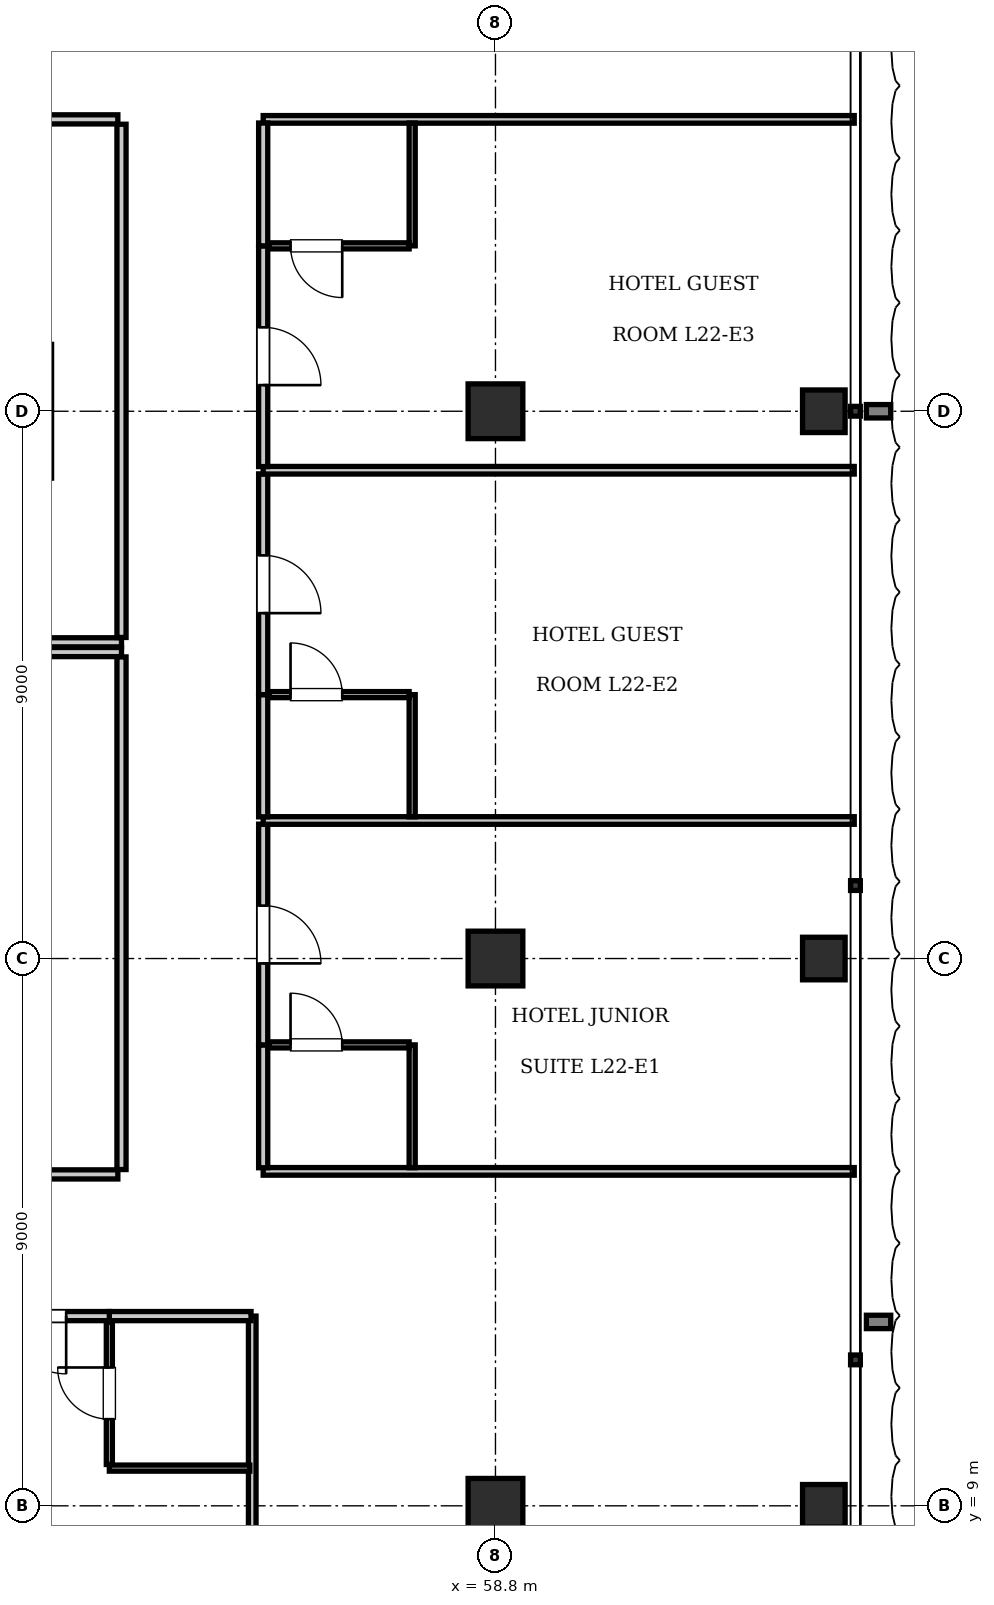
"""IFC4 building model, lengths in metres.
Left out: names, types, materials, properties, quantities, classifications, styles, units other than length and angle.
Written with IfcOpenShell. Run it as: python <this file> out.ifc"""

import sys

from ifc_helpers import new_model, si_unit, direction, frame, frame_2d, origin, origin_2d, place, context, subcontext, project, spatial, rectangle, i_section, extrude, element, fill, save


model = new_model("IFC4")
c1 = context("Model", 3, precision=1e-05, world=origin(), true_north=direction((0.0, 1.0)))
c2 = subcontext(c1, "Body", "Model", "MODEL_VIEW")
j1 = project(units=[si_unit("LENGTHUNIT", "METRE"), si_unit("PLANEANGLEUNIT", "RADIAN")], contexts=[c1])
p1 = place(None, origin())
s1 = spatial("IfcSite", under=j1, at=p1, CompositionType="ELEMENT")
p2 = place(p1, origin())
s2 = spatial("IfcBuilding", under=s1, at=p2, CompositionType="ELEMENT")
p3 = place(p2, frame((0.0, 0.0, 92.4)))
s3 = spatial("IfcBuildingStorey", under=s2, at=p3, CompositionType="ELEMENT", Elevation=92.4)
for number, where, z_axis, x_axis in (
    (1, (58.8, 9.0, 0.0), (0.0, 0.0, 1.0), (1.0, 0.0, 0.0)),
    (2, (58.8, 18.0, 0.0), (0.0, 0.0, 1.0), (1.0, 0.0, 0.0)),
    (3, (58.8, 27.0, 0.0), (0.0, 0.0, 1.0), (1.0, 0.0, 0.0)),
):
    element("IfcColumn", number, at=place(p3, frame(where, z_axis=z_axis, x_axis=x_axis)), inside=s3, PredefinedType="COLUMN", context=c2, shape_type="SweptSolid", body=[
        extrude(rectangle(XDim=0.9, YDim=0.9, at=origin_2d()), origin(), (0.0, 0.0, 1.0), 3.85),
    ])
for number, where, z_axis, x_axis in (
    (4, (64.2, 9.0, 0.0), (0.0, 0.0, 1.0), (1.0, 0.0, 0.0)),
    (5, (64.2, 18.0, 0.0), (0.0, 0.0, 1.0), (1.0, 0.0, 0.0)),
    (6, (64.2, 27.0, 0.0), (0.0, 0.0, 1.0), (1.0, 0.0, 0.0)),
):
    element("IfcColumn", number, at=place(p3, frame(where, z_axis=z_axis, x_axis=x_axis)), inside=s3, PredefinedType="COLUMN", context=c2, shape_type="SweptSolid", body=[
        extrude(i_section(OverallWidth=0.7, OverallDepth=0.7, WebThickness=0.028, FlangeThickness=0.044, at=origin_2d()), origin(), (0.0, 0.0, 1.0), 3.85),
    ])
p4 = place(p3, frame((22.95, 23.2, 0.0), z_axis=(0.0, 0.0, 1.0), x_axis=(1.0, 0.0, 0.0)))
e7 = element("IfcWall", 7, at=p4, inside=s3, PredefinedType="PARTITIONING", context=c2, shape_type="SweptSolid", body=[
    extrude(rectangle(XDim=29.7, YDim=0.15, at=frame_2d((14.85, 0.0))), origin(), (0.0, 0.0, 1.0), 3.61),
])
p5 = place(p3, frame((52.65, 23.28, 0.0), z_axis=(0.0, 0.0, 1.0), x_axis=(0.0, 1.0, 0.0)))
e8 = element("IfcWall", 8, at=p5, inside=s3, PredefinedType="PARTITIONING", context=c2, shape_type="SweptSolid", body=[
    extrude(rectangle(XDim=8.44, YDim=0.15, at=frame_2d((4.22, 0.0))), origin(), (0.0, 0.0, 1.0), 3.61),
])
p6 = place(p3, frame((42.582, 31.8, 0.0), z_axis=(0.0, 0.0, 1.0), x_axis=(1.0, 0.0, 0.0)))
e9 = element("IfcWall", 9, at=p6, inside=s3, PredefinedType="PARTITIONING", context=c2, shape_type="SweptSolid", body=[
    extrude(rectangle(XDim=10.008, YDim=0.15, at=frame_2d((5.004, 0.0))), origin(), (0.0, 0.0, 1.0), 3.61),
])
p7 = place(p6, frame((4.554, 0.0, 0.0)))
e10 = element("IfcOpeningElement", 10, at=p7, cuts=e9, PredefinedType="OPENING", context=c2, shape_type="SweptSolid", body=[
    extrude(rectangle(XDim=0.9, YDim=2.1, at=frame_2d((0.45, 1.05))), frame((0.0, 0.085, 0.0), z_axis=(0.0, -1.0, 0.0), x_axis=(1.0, 0.0, 0.0)), (0.0, 0.0, 1.0), 0.17),
])
p8 = place(p3, frame((22.95, 23.04, 0.0), z_axis=(0.0, 0.0, 1.0), x_axis=(1.0, 0.0, 0.0)))
e11 = element("IfcWall", 11, at=p8, inside=s3, PredefinedType="PARTITIONING", context=c2, shape_type="SweptSolid", body=[
    extrude(rectangle(XDim=29.7, YDim=0.15, at=frame_2d((14.85, 0.0))), origin(), (0.0, 0.0, 1.0), 3.61),
])
p9 = place(p3, frame((52.65, 14.53, 0.0), z_axis=(0.0, 0.0, 1.0), x_axis=(0.0, 1.0, 0.0)))
e12 = element("IfcWall", 12, at=p9, inside=s3, PredefinedType="PARTITIONING", context=c2, shape_type="SweptSolid", body=[
    extrude(rectangle(XDim=8.43, YDim=0.15, at=frame_2d((4.215, 0.0))), origin(), (0.0, 0.0, 1.0), 3.61),
])
p10 = place(p3, frame((33.969, 14.45, 0.0), z_axis=(0.0, 0.0, 1.0), x_axis=(1.0, 0.0, 0.0)))
e13 = element("IfcWall", 13, at=p10, inside=s3, PredefinedType="PARTITIONING", context=c2, shape_type="SweptSolid", body=[
    extrude(rectangle(XDim=18.621, YDim=0.15, at=frame_2d((9.311, 0.0))), origin(), (0.0, 0.0, 1.0), 3.61),
])
p11 = place(p10, frame((8.861, 0.0, 0.0)))
e14 = element("IfcOpeningElement", 14, at=p11, cuts=e13, PredefinedType="OPENING", context=c2, shape_type="SweptSolid", body=[
    extrude(rectangle(XDim=0.9, YDim=2.1, at=frame_2d((0.45, 1.05))), frame((0.0, 0.085, 0.0), z_axis=(0.0, -1.0, 0.0), x_axis=(1.0, 0.0, 0.0)), (0.0, 0.0, 1.0), 0.17),
])
p12 = place(p3, frame((54.8, 0.1, 0.0), z_axis=(0.0, 0.0, 1.0), x_axis=(0.0, 1.0, 0.0)))
e15 = element("IfcWall", 15, at=p12, inside=s3, PredefinedType="PARTITIONING", context=c2, shape_type="SweptSolid", body=[
    extrude(rectangle(XDim=12.02, YDim=0.125, at=frame_2d((6.01, 0.0))), origin(), (0.0, 0.0, 1.0), 3.61),
])
p13 = place(p3, frame((52.45, 12.12, 0.0), z_axis=(0.0, 0.0, 1.0), x_axis=(1.0, 0.0, 0.0)))
e16 = element("IfcWall", 16, at=p13, inside=s3, PredefinedType="PARTITIONING", context=c2, shape_type="SweptSolid", body=[
    extrude(rectangle(XDim=2.33, YDim=0.15, at=frame_2d((1.165, 0.0))), origin(), (0.0, 0.0, 1.0), 3.61),
])
p14 = place(p3, frame((52.45, 9.62, 0.0), z_axis=(0.0, 0.0, 1.0), x_axis=(1.0, 0.0, 0.0)))
e17 = element("IfcWall", 17, at=p14, inside=s3, PredefinedType="PARTITIONING", context=c2, shape_type="SweptSolid", body=[
    extrude(rectangle(XDim=2.31, YDim=0.1, at=frame_2d((1.155, 0.0))), origin(), (0.0, 0.0, 1.0), 3.61),
])
p15 = place(p3, frame((52.45, 9.68, 0.0), z_axis=(0.0, 0.0, 1.0), x_axis=(0.0, 1.0, 0.0)))
e18 = element("IfcWall", 18, at=p15, inside=s3, PredefinedType="PARTITIONING", context=c2, shape_type="SweptSolid", body=[
    extrude(rectangle(XDim=2.34, YDim=0.1, at=frame_2d((1.17, 0.0))), origin(), (0.0, 0.0, 1.0), 3.61),
])
p16 = place(p15, frame((0.745, 0.0, 0.0)))
e19 = element("IfcOpeningElement", 19, at=p16, cuts=e18, PredefinedType="OPENING", context=c2, shape_type="SweptSolid", body=[
    extrude(rectangle(XDim=0.85, YDim=2.1, at=frame_2d((0.425, 1.05))), frame((0.0, 0.06, 0.0), z_axis=(0.0, -1.0, 0.0), x_axis=(1.0, 0.0, 0.0)), (0.0, 0.0, 1.0), 0.12),
])
p17 = place(p3, frame((50.08, 12.12, 0.0), z_axis=(0.0, 0.0, 1.0), x_axis=(1.0, 0.0, 0.0)))
e20 = element("IfcWall", 20, at=p17, inside=s3, PredefinedType="PARTITIONING", context=c2, shape_type="SweptSolid", body=[
    extrude(rectangle(XDim=2.37, YDim=0.15, at=frame_2d((1.185, 0.0))), origin(), (0.0, 0.0, 1.0), 3.61),
])
p18 = place(p17, frame((0.71, 0.0, 0.0)))
e21 = element("IfcOpeningElement", 21, at=p18, cuts=e20, PredefinedType="OPENING", context=c2, shape_type="SweptSolid", body=[
    extrude(rectangle(XDim=0.95, YDim=2.15, at=frame_2d((0.475, 1.075))), frame((0.0, 0.085, 0.0), z_axis=(0.0, -1.0, 0.0), x_axis=(1.0, 0.0, 0.0)), (0.0, 0.0, 1.0), 0.17),
])
for number, where, z_axis, x_axis in (
    (22, (54.98, 14.5, 0.0), (0.0, 0.0, 1.0), (1.0, 0.0, 0.0)),
    (23, (54.98, 31.8, 0.0), (0.0, 0.0, 1.0), (1.0, 0.0, 0.0)),
):
    element("IfcWall", number, at=place(p3, frame(where, z_axis=z_axis, x_axis=x_axis)), inside=s3, PredefinedType="PARTITIONING", context=c2, shape_type="SweptSolid", body=[
        extrude(rectangle(XDim=9.72, YDim=0.125, at=frame_2d((4.86, 0.0))), origin(), (0.0, 0.0, 1.0), 3.61),
    ])
p19 = place(p3, frame((54.98, 14.56, 0.0), z_axis=(0.0, 0.0, 1.0), x_axis=(0.0, 1.0, 0.0)))
e24 = element("IfcWall", 24, at=p19, inside=s3, PredefinedType="PARTITIONING", context=c2, shape_type="SweptSolid", body=[
    extrude(rectangle(XDim=2.02, YDim=0.15, at=frame_2d((1.01, 0.0))), origin(), (0.0, 0.0, 1.0), 3.61),
])
p20 = place(p3, frame((54.98, 16.58, 0.0), z_axis=(0.0, 0.0, 1.0), x_axis=(0.0, 1.0, 0.0)))
e25 = element("IfcWall", 25, at=p20, inside=s3, PredefinedType="PARTITIONING", context=c2, shape_type="SweptSolid", body=[
    extrude(rectangle(XDim=3.63, YDim=0.15, at=frame_2d((1.815, 0.0))), origin(), (0.0, 0.0, 1.0), 3.61),
])
p21 = place(p20, frame((1.34, 0.0, 0.0)))
e26 = element("IfcOpeningElement", 26, at=p21, cuts=e25, PredefinedType="OPENING", context=c2, shape_type="SweptSolid", body=[
    extrude(rectangle(XDim=0.95, YDim=2.15, at=frame_2d((0.475, 1.075))), frame((0.0, 0.085, 0.0), z_axis=(0.0, -1.0, 0.0), x_axis=(1.0, 0.0, 0.0)), (0.0, 0.0, 1.0), 0.17),
])
p22 = place(p3, frame((57.43, 14.56, 0.0), z_axis=(0.0, 0.0, 1.0), x_axis=(0.0, 1.0, 0.0)))
e27 = element("IfcWall", 27, at=p22, inside=s3, PredefinedType="PARTITIONING", context=c2, shape_type="SweptSolid", body=[
    extrude(rectangle(XDim=2.02, YDim=0.1, at=frame_2d((1.01, 0.0))), origin(), (0.0, 0.0, 1.0), 3.61),
])
p23 = place(p3, frame((55.08, 16.58, 0.0), z_axis=(0.0, 0.0, 1.0), x_axis=(1.0, 0.0, 0.0)))
e28 = element("IfcWall", 28, at=p23, inside=s3, PredefinedType="PARTITIONING", context=c2, shape_type="SweptSolid", body=[
    extrude(rectangle(XDim=2.3, YDim=0.1, at=frame_2d((1.15, 0.0))), origin(), (0.0, 0.0, 1.0), 3.61),
])
p24 = place(p23, frame((0.35, 0.0, 0.0)))
e29 = element("IfcOpeningElement", 29, at=p24, cuts=e28, PredefinedType="OPENING", context=c2, shape_type="SweptSolid", body=[
    extrude(rectangle(XDim=0.85, YDim=2.1, at=frame_2d((0.425, 1.05))), frame((0.0, 0.06, 0.0), z_axis=(0.0, -1.0, 0.0), x_axis=(1.0, 0.0, 0.0)), (0.0, 0.0, 1.0), 0.12),
])
p25 = place(p3, frame((54.98, 20.27, 0.0), z_axis=(0.0, 0.0, 1.0), x_axis=(1.0, 0.0, 0.0)))
e30 = element("IfcWall", 30, at=p25, inside=s3, PredefinedType="PARTITIONING", context=c2, shape_type="SweptSolid", body=[
    extrude(rectangle(XDim=9.72, YDim=0.125, at=frame_2d((4.86, 0.0))), origin(), (0.0, 0.0, 1.0), 3.61),
])
p26 = place(p3, frame((54.98, 20.33, 0.0), z_axis=(0.0, 0.0, 1.0), x_axis=(0.0, 1.0, 0.0)))
e31 = element("IfcWall", 31, at=p26, inside=s3, PredefinedType="PARTITIONING", context=c2, shape_type="SweptSolid", body=[
    extrude(rectangle(XDim=2.01, YDim=0.15, at=frame_2d((1.005, 0.0))), origin(), (0.0, 0.0, 1.0), 3.61),
])
p27 = place(p3, frame((54.98, 22.34, 0.0), z_axis=(0.0, 0.0, 1.0), x_axis=(0.0, 1.0, 0.0)))
e32 = element("IfcWall", 32, at=p27, inside=s3, PredefinedType="PARTITIONING", context=c2, shape_type="SweptSolid", body=[
    extrude(rectangle(XDim=3.63, YDim=0.15, at=frame_2d((1.815, 0.0))), origin(), (0.0, 0.0, 1.0), 3.61),
])
p28 = place(p27, frame((1.34, 0.0, 0.0)))
e33 = element("IfcOpeningElement", 33, at=p28, cuts=e32, PredefinedType="OPENING", context=c2, shape_type="SweptSolid", body=[
    extrude(rectangle(XDim=0.95, YDim=2.15, at=frame_2d((0.475, 1.075))), frame((0.0, 0.085, 0.0), z_axis=(0.0, -1.0, 0.0), x_axis=(1.0, 0.0, 0.0)), (0.0, 0.0, 1.0), 0.17),
])
p29 = place(p3, frame((57.43, 20.33, 0.0), z_axis=(0.0, 0.0, 1.0), x_axis=(0.0, 1.0, 0.0)))
e34 = element("IfcWall", 34, at=p29, inside=s3, PredefinedType="PARTITIONING", context=c2, shape_type="SweptSolid", body=[
    extrude(rectangle(XDim=2.01, YDim=0.1, at=frame_2d((1.005, 0.0))), origin(), (0.0, 0.0, 1.0), 3.61),
])
p30 = place(p3, frame((55.08, 22.34, 0.0), z_axis=(0.0, 0.0, 1.0), x_axis=(1.0, 0.0, 0.0)))
e35 = element("IfcWall", 35, at=p30, inside=s3, PredefinedType="PARTITIONING", context=c2, shape_type="SweptSolid", body=[
    extrude(rectangle(XDim=2.3, YDim=0.1, at=frame_2d((1.15, 0.0))), origin(), (0.0, 0.0, 1.0), 3.61),
])
p31 = place(p30, frame((0.35, 0.0, 0.0)))
e36 = element("IfcOpeningElement", 36, at=p31, cuts=e35, PredefinedType="OPENING", context=c2, shape_type="SweptSolid", body=[
    extrude(rectangle(XDim=0.85, YDim=2.1, at=frame_2d((0.425, 1.05))), frame((0.0, 0.06, 0.0), z_axis=(0.0, -1.0, 0.0), x_axis=(1.0, 0.0, 0.0)), (0.0, 0.0, 1.0), 0.12),
])
p32 = place(p3, frame((54.98, 26.03, 0.0), z_axis=(0.0, 0.0, 1.0), x_axis=(1.0, 0.0, 0.0)))
e37 = element("IfcWall", 37, at=p32, inside=s3, PredefinedType="PARTITIONING", context=c2, shape_type="SweptSolid", body=[
    extrude(rectangle(XDim=9.72, YDim=0.125, at=frame_2d((4.86, 0.0))), origin(), (0.0, 0.0, 1.0), 3.61),
])
p33 = place(p3, frame((54.98, 26.09, 0.0), z_axis=(0.0, 0.0, 1.0), x_axis=(0.0, 1.0, 0.0)))
e38 = element("IfcWall", 38, at=p33, inside=s3, PredefinedType="PARTITIONING", context=c2, shape_type="SweptSolid", body=[
    extrude(rectangle(XDim=3.63, YDim=0.15, at=frame_2d((1.815, 0.0))), origin(), (0.0, 0.0, 1.0), 3.61),
])
p34 = place(p33, frame((1.34, 0.0, 0.0)))
e39 = element("IfcOpeningElement", 39, at=p34, cuts=e38, PredefinedType="OPENING", context=c2, shape_type="SweptSolid", body=[
    extrude(rectangle(XDim=0.95, YDim=2.15, at=frame_2d((0.475, 1.075))), frame((0.0, 0.085, 0.0), z_axis=(0.0, -1.0, 0.0), x_axis=(1.0, 0.0, 0.0)), (0.0, 0.0, 1.0), 0.17),
])
p35 = place(p3, frame((54.98, 29.72, 0.0), z_axis=(0.0, 0.0, 1.0), x_axis=(0.0, 1.0, 0.0)))
e40 = element("IfcWall", 40, at=p35, inside=s3, PredefinedType="PARTITIONING", context=c2, shape_type="SweptSolid", body=[
    extrude(rectangle(XDim=2.02, YDim=0.15, at=frame_2d((1.01, 0.0))), origin(), (0.0, 0.0, 1.0), 3.61),
])
p36 = place(p3, frame((57.43, 29.72, 0.0), z_axis=(0.0, 0.0, 1.0), x_axis=(0.0, 1.0, 0.0)))
e41 = element("IfcWall", 41, at=p36, inside=s3, PredefinedType="PARTITIONING", context=c2, shape_type="SweptSolid", body=[
    extrude(rectangle(XDim=2.02, YDim=0.1, at=frame_2d((1.01, 0.0))), origin(), (0.0, 0.0, 1.0), 3.61),
])
p37 = place(p3, frame((55.08, 29.72, 0.0), z_axis=(0.0, 0.0, 1.0), x_axis=(1.0, 0.0, 0.0)))
e42 = element("IfcWall", 42, at=p37, inside=s3, PredefinedType="PARTITIONING", context=c2, shape_type="SweptSolid", body=[
    extrude(rectangle(XDim=2.3, YDim=0.1, at=frame_2d((1.15, 0.0))), origin(), (0.0, 0.0, 1.0), 3.61),
])
p38 = place(p37, frame((0.35, 0.0, 0.0)))
e43 = element("IfcOpeningElement", 43, at=p38, cuts=e42, PredefinedType="OPENING", context=c2, shape_type="SweptSolid", body=[
    extrude(rectangle(XDim=0.85, YDim=2.1, at=frame_2d((0.425, 1.05))), frame((0.0, 0.06, 0.0), z_axis=(0.0, -1.0, 0.0), x_axis=(1.0, 0.0, 0.0)), (0.0, 0.0, 1.0), 0.12),
])
p39 = place(p16, origin())
e44 = element("IfcDoor", 44, at=p39, inside=s3, OperationType="SINGLE_SWING_RIGHT", PredefinedType="DOOR", context=c2, shape_type="SweptSolid", body=[
    extrude(rectangle(XDim=0.85, YDim=2.1, at=frame_2d((0.425, 1.05))), frame((0.0, 0.025, 0.0), z_axis=(0.0, -1.0, 0.0), x_axis=(1.0, 0.0, 0.0)), (0.0, 0.0, 1.0), 0.05),
])
fill(e19, e44)
p40 = place(p18, frame((0.95, 0.0, 0.0), z_axis=(0.0, 0.0, 1.0), x_axis=(-1.0, 0.0, 0.0)))
e45 = element("IfcDoor", 45, at=p40, inside=s3, OperationType="SINGLE_SWING_LEFT", PredefinedType="DOOR", context=c2, shape_type="SweptSolid", body=[
    extrude(rectangle(XDim=0.95, YDim=2.15, at=frame_2d((0.475, 1.075))), frame((0.0, 0.025, 0.0), z_axis=(0.0, -1.0, 0.0), x_axis=(1.0, 0.0, 0.0)), (0.0, 0.0, 1.0), 0.05),
])
fill(e21, e45)
p41 = place(p24, origin())
e46 = element("IfcDoor", 46, at=p41, inside=s3, OperationType="SINGLE_SWING_LEFT", PredefinedType="DOOR", context=c2, shape_type="SweptSolid", body=[
    extrude(rectangle(XDim=0.85, YDim=2.1, at=frame_2d((0.425, 1.05))), frame((0.0, 0.025, 0.0), z_axis=(0.0, -1.0, 0.0), x_axis=(1.0, 0.0, 0.0)), (0.0, 0.0, 1.0), 0.05),
])
fill(e29, e46)
p42 = place(p21, frame((0.95, 0.0, 0.0), z_axis=(0.0, 0.0, 1.0), x_axis=(-1.0, 0.0, 0.0)))
e47 = element("IfcDoor", 47, at=p42, inside=s3, OperationType="SINGLE_SWING_RIGHT", PredefinedType="DOOR", context=c2, shape_type="SweptSolid", body=[
    extrude(rectangle(XDim=0.95, YDim=2.15, at=frame_2d((0.475, 1.075))), frame((0.0, 0.025, 0.0), z_axis=(0.0, -1.0, 0.0), x_axis=(1.0, 0.0, 0.0)), (0.0, 0.0, 1.0), 0.05),
])
fill(e26, e47)
p43 = place(p31, origin())
e48 = element("IfcDoor", 48, at=p43, inside=s3, OperationType="SINGLE_SWING_LEFT", PredefinedType="DOOR", context=c2, shape_type="SweptSolid", body=[
    extrude(rectangle(XDim=0.85, YDim=2.1, at=frame_2d((0.425, 1.05))), frame((0.0, 0.025, 0.0), z_axis=(0.0, -1.0, 0.0), x_axis=(1.0, 0.0, 0.0)), (0.0, 0.0, 1.0), 0.05),
])
fill(e36, e48)
p44 = place(p28, frame((0.95, 0.0, 0.0), z_axis=(0.0, 0.0, 1.0), x_axis=(-1.0, 0.0, 0.0)))
e49 = element("IfcDoor", 49, at=p44, inside=s3, OperationType="SINGLE_SWING_RIGHT", PredefinedType="DOOR", context=c2, shape_type="SweptSolid", body=[
    extrude(rectangle(XDim=0.95, YDim=2.15, at=frame_2d((0.475, 1.075))), frame((0.0, 0.025, 0.0), z_axis=(0.0, -1.0, 0.0), x_axis=(1.0, 0.0, 0.0)), (0.0, 0.0, 1.0), 0.05),
])
fill(e33, e49)
p45 = place(p38, frame((0.85, 0.0, 0.0), z_axis=(0.0, 0.0, 1.0), x_axis=(-1.0, 0.0, 0.0)))
e50 = element("IfcDoor", 50, at=p45, inside=s3, OperationType="SINGLE_SWING_LEFT", PredefinedType="DOOR", context=c2, shape_type="SweptSolid", body=[
    extrude(rectangle(XDim=0.85, YDim=2.1, at=frame_2d((0.425, 1.05))), frame((0.0, 0.025, 0.0), z_axis=(0.0, -1.0, 0.0), x_axis=(1.0, 0.0, 0.0)), (0.0, 0.0, 1.0), 0.05),
])
fill(e43, e50)
p46 = place(p34, frame((0.95, 0.0, 0.0), z_axis=(0.0, 0.0, 1.0), x_axis=(-1.0, 0.0, 0.0)))
e51 = element("IfcDoor", 51, at=p46, inside=s3, OperationType="SINGLE_SWING_RIGHT", PredefinedType="DOOR", context=c2, shape_type="SweptSolid", body=[
    extrude(rectangle(XDim=0.95, YDim=2.15, at=frame_2d((0.475, 1.075))), frame((0.0, 0.025, 0.0), z_axis=(0.0, -1.0, 0.0), x_axis=(1.0, 0.0, 0.0)), (0.0, 0.0, 1.0), 0.05),
])
fill(e39, e51)
save(model, sys.argv[1])
